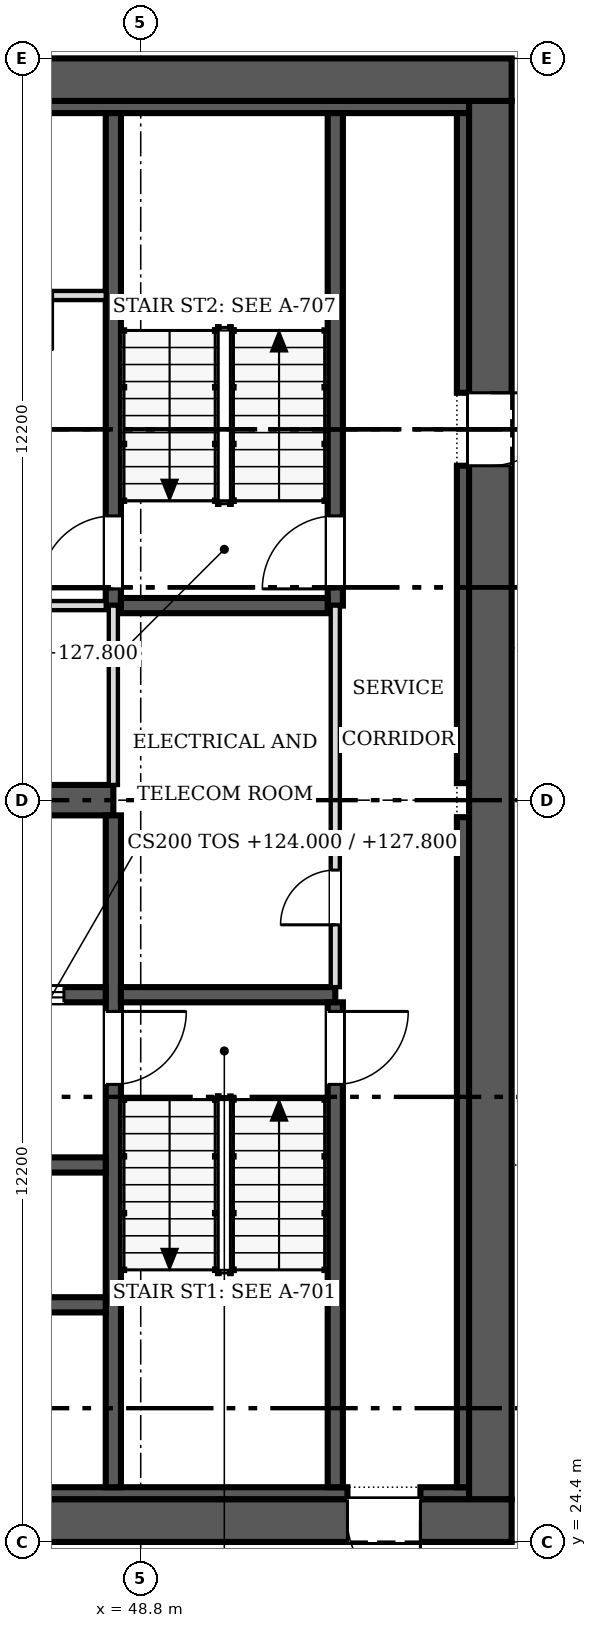
"""IFC4 building model, lengths in metres.
Left out: names, types, materials, properties, quantities, classifications, styles, units other than length and angle.
Written with IfcOpenShell. Run it as: python <this file> out.ifc"""

import sys

from ifc_helpers import new_model, si_unit, direction, frame, frame_2d, origin, place, context, subcontext, project, spatial, rectangle, extrude, source, transform, mapped, element, fill, save


model = new_model("IFC4")
c1 = context("Model", 3, precision=1e-05, world=origin(), true_north=direction((0.0, 1.0)))
c2 = subcontext(c1, "Body", "Model", "MODEL_VIEW")
j1 = project(units=[si_unit("LENGTHUNIT", "METRE"), si_unit("PLANEANGLEUNIT", "RADIAN")], contexts=[c1])
p1 = place(None, origin())
s1 = spatial("IfcSite", under=j1, at=p1, CompositionType="ELEMENT")
p2 = place(p1, origin())
s2 = spatial("IfcBuilding", under=s1, at=p2, CompositionType="ELEMENT")
p3 = place(p2, frame((0.0, 0.0, 124.0)))
s3 = spatial("IfcBuildingStorey", under=s2, at=p3, CompositionType="ELEMENT", Elevation=124.0)
p4 = place(p3, frame((54.9, 24.75, 0.0), z_axis=(0.0, 0.0, 1.0), x_axis=(-1.0, 0.0, 0.0)))
e1 = element("IfcWall", 1, at=p4, inside=s3, PredefinedType="SHEAR", context=c2, shape_type="SweptSolid", body=[
    extrude(rectangle(XDim=24.4, YDim=0.7, at=frame_2d((12.2, 0.0))), origin(), (0.0, 0.0, 1.0), 3.8),
])
m1 = source(origin(), c2, "Body", "SweptSolid", [
    extrude(rectangle(XDim=1.2, YDim=2.1, at=frame_2d((0.6, 1.05))), frame((0.0, 0.36, 0.0), z_axis=(0.0, -1.0, 0.0), x_axis=(1.0, 0.0, 0.0)), (0.0, 0.0, 1.0), 0.72),
])
p5 = place(p4, frame((1.5, 0.0, 0.0)))
e2 = element("IfcOpeningElement", 2, at=p5, cuts=e1, PredefinedType="OPENING", context=c2, shape_type="MappedRepresentation", body=[
    mapped(m1, transform((0.0, 0.0, 0.0), scale=1.0)),
])
p6 = place(p3, frame((30.5, 48.45, 0.0), z_axis=(0.0, 0.0, 1.0), x_axis=(1.0, 0.0, 0.0)))
e3 = element("IfcWall", 3, at=p6, inside=s3, PredefinedType="SHEAR", context=c2, shape_type="SweptSolid", body=[
    extrude(rectangle(XDim=24.4, YDim=0.7, at=frame_2d((12.2, 0.0))), origin(), (0.0, 0.0, 1.0), 3.8),
])
p7 = place(p3, frame((54.55, 48.1, 0.0), z_axis=(0.0, 0.0, 1.0), x_axis=(0.0, -1.0, 0.0)))
e4 = element("IfcWall", 4, at=p7, inside=s3, PredefinedType="SHEAR", context=c2, shape_type="SweptSolid", body=[
    extrude(rectangle(XDim=23.0, YDim=0.7, at=frame_2d((11.5, 0.0))), origin(), (0.0, 0.0, 1.0), 3.8),
])
p8 = place(p7, frame((4.8, 0.0, 0.0)))
e5 = element("IfcOpeningElement", 5, at=p8, cuts=e4, PredefinedType="OPENING", context=c2, shape_type="MappedRepresentation", body=[
    mapped(m1, transform((0.0, 0.0, 0.0), scale=1.0)),
])
p9 = place(p3, frame((31.2, 25.2, 0.0), z_axis=(0.0, 0.0, 1.0), x_axis=(1.0, 0.0, 0.0)))
e6 = element("IfcWall", 6, at=p9, inside=s3, PredefinedType="SOLIDWALL", context=c2, shape_type="SweptSolid", body=[
    extrude(rectangle(XDim=21.0, YDim=0.2, at=frame_2d((10.5, 0.0))), origin(), (0.0, 0.0, 1.0), 3.8),
])
p10 = place(p3, frame((53.4, 25.2, 0.0), z_axis=(0.0, 0.0, 1.0), x_axis=(1.0, 0.0, 0.0)))
e7 = element("IfcWall", 7, at=p10, inside=s3, PredefinedType="SOLIDWALL", context=c2, shape_type="SweptSolid", body=[
    extrude(rectangle(XDim=0.8, YDim=0.2, at=frame_2d((0.4, 0.0))), origin(), (0.0, 0.0, 1.0), 3.8),
])
p11 = place(p3, frame((31.2, 48.0, 0.0), z_axis=(0.0, 0.0, 1.0), x_axis=(1.0, 0.0, 0.0)))
e8 = element("IfcWall", 8, at=p11, inside=s3, PredefinedType="SOLIDWALL", context=c2, shape_type="SweptSolid", body=[
    extrude(rectangle(XDim=23.0, YDim=0.2, at=frame_2d((11.5, 0.0))), origin(), (0.0, 0.0, 1.0), 3.8),
])
p12 = place(p3, frame((54.1, 25.3, 0.0), z_axis=(0.0, 0.0, 1.0), x_axis=(0.0, 1.0, 0.0)))
e9 = element("IfcWall", 9, at=p12, inside=s3, PredefinedType="SOLIDWALL", context=c2, shape_type="SweptSolid", body=[
    extrude(rectangle(XDim=11.02, YDim=0.2, at=frame_2d((5.51, 0.0))), origin(), (0.0, 0.0, 1.0), 3.8),
])
p13 = place(p3, frame((54.1, 36.88, 0.0), z_axis=(0.0, 0.0, 1.0), x_axis=(0.0, 1.0, 0.0)))
e10 = element("IfcWall", 10, at=p13, inside=s3, PredefinedType="SOLIDWALL", context=c2, shape_type="SweptSolid", body=[
    extrude(rectangle(XDim=5.22, YDim=0.2, at=frame_2d((2.61, 0.0))), origin(), (0.0, 0.0, 1.0), 3.8),
])
p14 = place(p3, frame((54.1, 43.3, 0.0), z_axis=(0.0, 0.0, 1.0), x_axis=(0.0, 1.0, 0.0)))
e11 = element("IfcWall", 11, at=p14, inside=s3, PredefinedType="SOLIDWALL", context=c2, shape_type="SweptSolid", body=[
    extrude(rectangle(XDim=4.6, YDim=0.2, at=frame_2d((2.3, 0.0))), origin(), (0.0, 0.0, 1.0), 3.8),
])
p15 = place(p3, frame((31.4, 36.6, 0.0), z_axis=(0.0, 0.0, 1.0), x_axis=(1.0, 0.0, 0.0)))
e12 = element("IfcWall", 12, at=p15, inside=s3, PredefinedType="SHEAR", context=c2, shape_type="SweptSolid", body=[
    extrude(rectangle(XDim=16.95, YDim=0.5, at=frame_2d((8.475, 0.0))), origin(), (0.0, 0.0, 1.0), 3.8),
])
p16 = place(p3, frame((48.35, 36.35, 0.0), z_axis=(0.0, 0.0, 1.0), x_axis=(0.0, -1.0, 0.0)))
e13 = element("IfcWall", 13, at=p16, inside=s3, PredefinedType="SOLIDWALL", context=c2, shape_type="SweptSolid", body=[
    extrude(rectangle(XDim=11.05, YDim=0.25, at=frame_2d((5.525, 0.0))), origin(), (0.0, 0.0, 1.0), 3.8),
])
m2 = source(origin(), c2, "Body", "SweptSolid", [
    extrude(rectangle(XDim=1.2, YDim=2.1, at=frame_2d((0.6, 1.05))), frame((0.0, 0.135, 0.0), z_axis=(0.0, -1.0, 0.0), x_axis=(1.0, 0.0, 0.0)), (0.0, 0.0, 1.0), 0.27),
])
p17 = place(p16, frame((3.225, 0.0, 0.0)))
e14 = element("IfcOpeningElement", 14, at=p17, cuts=e13, PredefinedType="OPENING", context=c2, shape_type="MappedRepresentation", body=[
    mapped(m2, transform((0.0, 0.0, 0.0), scale=1.0)),
])
p18 = place(p3, frame((48.225, 33.4, 0.0), z_axis=(0.0, 0.0, 1.0), x_axis=(-1.0, 0.0, 0.0)))
e15 = element("IfcWall", 15, at=p18, inside=s3, PredefinedType="SOLIDWALL", context=c2, shape_type="SweptSolid", body=[
    extrude(rectangle(XDim=5.275, YDim=0.25, at=frame_2d((2.638, 0.0))), origin(), (0.0, 0.0, 1.0), 3.8),
])
p19 = place(p18, frame((3.512, 0.0, 0.0)))
e16 = element("IfcOpeningElement", 16, at=p19, cuts=e15, PredefinedType="OPENING", context=c2, shape_type="MappedRepresentation", body=[
    mapped(m2, transform((0.0, 0.0, 0.0), scale=1.0)),
])
p20 = place(p18, frame((0.688, 0.0, 0.0)))
e17 = element("IfcOpeningElement", 17, at=p20, cuts=e15, PredefinedType="OPENING", context=c2, shape_type="MappedRepresentation", body=[
    mapped(m2, transform((0.0, 0.0, 0.0), scale=1.0)),
])
p21 = place(p3, frame((48.475, 33.4, 0.0), z_axis=(0.0, 0.0, 1.0), x_axis=(1.0, 0.0, 0.0)))
e18 = element("IfcWall", 18, at=p21, inside=s3, PredefinedType="SOLIDWALL", context=c2, shape_type="SweptSolid", body=[
    extrude(rectangle(XDim=3.525, YDim=0.25, at=frame_2d((1.762, 0.0))), origin(), (0.0, 0.0, 1.0), 3.8),
])
p22 = place(p3, frame((48.35, 47.9, 0.0), z_axis=(0.0, 0.0, 1.0), x_axis=(0.0, -1.0, 0.0)))
e19 = element("IfcWall", 19, at=p22, inside=s3, PredefinedType="SOLIDWALL", context=c2, shape_type="SweptSolid", body=[
    extrude(rectangle(XDim=8.1, YDim=0.25, at=frame_2d((4.05, 0.0))), origin(), (0.0, 0.0, 1.0), 3.8),
])
p23 = place(p22, frame((6.625, 0.0, 0.0)))
e20 = element("IfcOpeningElement", 20, at=p23, cuts=e19, PredefinedType="OPENING", context=c2, shape_type="MappedRepresentation", body=[
    mapped(m2, transform((0.0, 0.0, 0.0), scale=1.0)),
])
p24 = place(p3, frame((52.0, 25.3, 0.0), z_axis=(0.0, 0.0, 1.0), x_axis=(0.0, 1.0, 0.0)))
e21 = element("IfcWall", 21, at=p24, inside=s3, PredefinedType="SOLIDWALL", context=c2, shape_type="SweptSolid", body=[
    extrude(rectangle(XDim=7.975, YDim=0.25, at=frame_2d((3.987, 0.0))), origin(), (0.0, 0.0, 1.0), 3.8),
])
p25 = place(p24, frame((6.625, 0.0, 0.0)))
e22 = element("IfcOpeningElement", 22, at=p25, cuts=e21, PredefinedType="OPENING", context=c2, shape_type="MappedRepresentation", body=[
    mapped(m2, transform((0.0, 0.0, 0.0), scale=1.0)),
])
p26 = place(p3, frame((52.0, 39.8, 0.0), z_axis=(0.0, 0.0, 1.0), x_axis=(0.0, 1.0, 0.0)))
e23 = element("IfcWall", 23, at=p26, inside=s3, PredefinedType="SOLIDWALL", context=c2, shape_type="SweptSolid", body=[
    extrude(rectangle(XDim=8.1, YDim=0.25, at=frame_2d((4.05, 0.0))), origin(), (0.0, 0.0, 1.0), 3.8),
])
p27 = place(p26, frame((0.275, 0.0, 0.0)))
e24 = element("IfcOpeningElement", 24, at=p27, cuts=e23, PredefinedType="OPENING", context=c2, shape_type="MappedRepresentation", body=[
    mapped(m2, transform((0.0, 0.0, 0.0), scale=1.0)),
])
for number, where, z_axis, x_axis in (
    (25, (42.95, 28.3, 0.0), (0.0, 0.0, 1.0), (1.0, 0.0, 0.0)),
    (26, (42.95, 30.6, 0.0), (0.0, 0.0, 1.0), (1.0, 0.0, 0.0)),
):
    element("IfcWall", number, at=place(p3, frame(where, z_axis=z_axis, x_axis=x_axis)), inside=s3, PredefinedType="SOLIDWALL", context=c2, shape_type="SweptSolid", body=[
        extrude(rectangle(XDim=5.275, YDim=0.25, at=frame_2d((2.638, 0.0))), origin(), (0.0, 0.0, 1.0), 3.8),
    ])
p28 = place(p3, frame((48.475, 39.8, 0.0), z_axis=(0.0, 0.0, 1.0), x_axis=(1.0, 0.0, 0.0)))
e27 = element("IfcWall", 27, at=p28, inside=s3, PredefinedType="SOLIDWALL", context=c2, shape_type="SweptSolid", body=[
    extrude(rectangle(XDim=3.4, YDim=0.25, at=frame_2d((1.7, 0.0))), origin(), (0.0, 0.0, 1.0), 3.8),
])
p29 = place(p3, frame((52.0, 33.525, 0.0), z_axis=(0.0, 0.0, 1.0), x_axis=(0.0, 1.0, 0.0)))
e28 = element("IfcWall", 28, at=p29, inside=s3, PredefinedType="PARTITIONING", context=c2, shape_type="SweptSolid", body=[
    extrude(rectangle(XDim=6.275, YDim=0.15, at=frame_2d((3.138, 0.0))), origin(), (0.0, 0.0, 1.0), 3.6),
])
m3 = source(origin(), c2, "Body", "SweptSolid", [
    extrude(rectangle(XDim=0.9, YDim=2.1, at=frame_2d((0.45, 1.05))), frame((0.0, 0.085, 0.0), z_axis=(0.0, -1.0, 0.0), x_axis=(1.0, 0.0, 0.0)), (0.0, 0.0, 1.0), 0.17),
])
p30 = place(p29, frame((1.025, 0.0, 0.0)))
e29 = element("IfcOpeningElement", 29, at=p30, cuts=e28, PredefinedType="OPENING", context=c2, shape_type="MappedRepresentation", body=[
    mapped(m3, transform((0.0, 0.0, 0.0), scale=1.0)),
])
p31 = place(p3, frame((48.225, 39.8, 0.0), z_axis=(0.0, 0.0, 1.0), x_axis=(-1.0, 0.0, 0.0)))
e30 = element("IfcWall", 30, at=p31, inside=s3, PredefinedType="PARTITIONING", context=c2, shape_type="SweptSolid", body=[
    extrude(rectangle(XDim=5.275, YDim=0.15, at=frame_2d((2.638, 0.0))), origin(), (0.0, 0.0, 1.0), 3.6),
])
p32 = place(p31, frame((2.25, 0.0, 0.0)))
e31 = element("IfcOpeningElement", 31, at=p32, cuts=e30, PredefinedType="OPENING", context=c2, shape_type="MappedRepresentation", body=[
    mapped(m3, transform((0.0, 0.0, 0.0), scale=1.0)),
])
p33 = place(p3, frame((42.95, 44.9, 0.0), z_axis=(0.0, 0.0, 1.0), x_axis=(1.0, 0.0, 0.0)))
e32 = element("IfcWall", 32, at=p33, inside=s3, PredefinedType="PARTITIONING", context=c2, shape_type="SweptSolid", body=[
    extrude(rectangle(XDim=5.275, YDim=0.15, at=frame_2d((2.638, 0.0))), origin(), (0.0, 0.0, 1.0), 3.6),
])
p34 = place(p33, frame((0.712, 0.0, 0.0)))
e33 = element("IfcOpeningElement", 33, at=p34, cuts=e32, PredefinedType="OPENING", context=c2, shape_type="MappedRepresentation", body=[
    mapped(m3, transform((0.0, 0.0, 0.0), scale=1.0)),
])
p35 = place(p33, frame((3.5, 0.0, 0.0)))
e34 = element("IfcOpeningElement", 34, at=p35, cuts=e32, PredefinedType="OPENING", context=c2, shape_type="MappedRepresentation", body=[
    mapped(m3, transform((0.0, 0.0, 0.0), scale=1.0)),
])
p36 = place(p3, frame((48.35, 36.85, 0.0), z_axis=(0.0, 0.0, 1.0), x_axis=(0.0, 1.0, 0.0)))
e35 = element("IfcWall", 35, at=p36, inside=s3, PredefinedType="PARTITIONING", context=c2, shape_type="SweptSolid", body=[
    extrude(rectangle(XDim=2.95, YDim=0.15, at=frame_2d((1.475, 0.0))), origin(), (0.0, 0.0, 1.0), 3.6),
])
m4 = source(origin(), c2, "Body", "SweptSolid", [
    extrude(rectangle(XDim=1.2, YDim=2.1, at=frame_2d((0.6, 1.05))), frame((0.0, 0.025, 0.0), z_axis=(0.0, -1.0, 0.0), x_axis=(1.0, 0.0, 0.0)), (0.0, 0.0, 1.0), 0.05),
])
p37 = place(p5, origin())
e36 = element("IfcDoor", 36, at=p37, inside=s3, OperationType="SINGLE_SWING_LEFT", PredefinedType="DOOR", context=c2, shape_type="MappedRepresentation", body=[
    mapped(m4, transform((0.0, 0.0, 0.0), scale=1.0)),
])
fill(e2, e36)
p38 = place(p8, origin())
e37 = element("IfcDoor", 37, at=p38, inside=s3, OperationType="SINGLE_SWING_LEFT", PredefinedType="DOOR", context=c2, shape_type="MappedRepresentation", body=[
    mapped(m4, transform((0.0, 0.0, 0.0), scale=1.0)),
])
fill(e5, e37)
p39 = place(p17, origin())
e38 = element("IfcDoor", 38, at=p39, inside=s3, OperationType="SINGLE_SWING_LEFT", PredefinedType="DOOR", context=c2, shape_type="MappedRepresentation", body=[
    mapped(m4, transform((0.0, 0.0, 0.0), scale=1.0)),
])
fill(e14, e38)
p40 = place(p20, origin())
e39 = element("IfcDoor", 39, at=p40, inside=s3, OperationType="DOUBLE_DOOR_SLIDING", PredefinedType="DOOR", context=c2, shape_type="MappedRepresentation", body=[
    mapped(m4, transform((0.0, 0.0, 0.0), scale=1.0)),
])
fill(e17, e39)
p41 = place(p23, origin())
e40 = element("IfcDoor", 40, at=p41, inside=s3, OperationType="SINGLE_SWING_RIGHT", PredefinedType="DOOR", context=c2, shape_type="MappedRepresentation", body=[
    mapped(m4, transform((0.0, 0.0, 0.0), scale=1.0)),
])
fill(e20, e40)
p42 = place(p25, origin())
e41 = element("IfcDoor", 41, at=p42, inside=s3, OperationType="SINGLE_SWING_RIGHT", PredefinedType="DOOR", context=c2, shape_type="MappedRepresentation", body=[
    mapped(m4, transform((0.0, 0.0, 0.0), scale=1.0)),
])
fill(e22, e41)
p43 = place(p27, origin())
e42 = element("IfcDoor", 42, at=p43, inside=s3, OperationType="SINGLE_SWING_LEFT", PredefinedType="DOOR", context=c2, shape_type="MappedRepresentation", body=[
    mapped(m4, transform((0.0, 0.0, 0.0), scale=1.0)),
])
fill(e24, e42)
m5 = source(origin(), c2, "Body", "SweptSolid", [
    extrude(rectangle(XDim=0.9, YDim=2.1, at=frame_2d((0.45, 1.05))), frame((0.0, 0.025, 0.0), z_axis=(0.0, -1.0, 0.0), x_axis=(1.0, 0.0, 0.0)), (0.0, 0.0, 1.0), 0.05),
])
p44 = place(p30, origin())
e43 = element("IfcDoor", 43, at=p44, inside=s3, OperationType="SINGLE_SWING_LEFT", PredefinedType="DOOR", context=c2, shape_type="MappedRepresentation", body=[
    mapped(m5, transform((0.0, 0.0, 0.0), scale=1.0)),
])
fill(e29, e43)
save(model, sys.argv[1])
